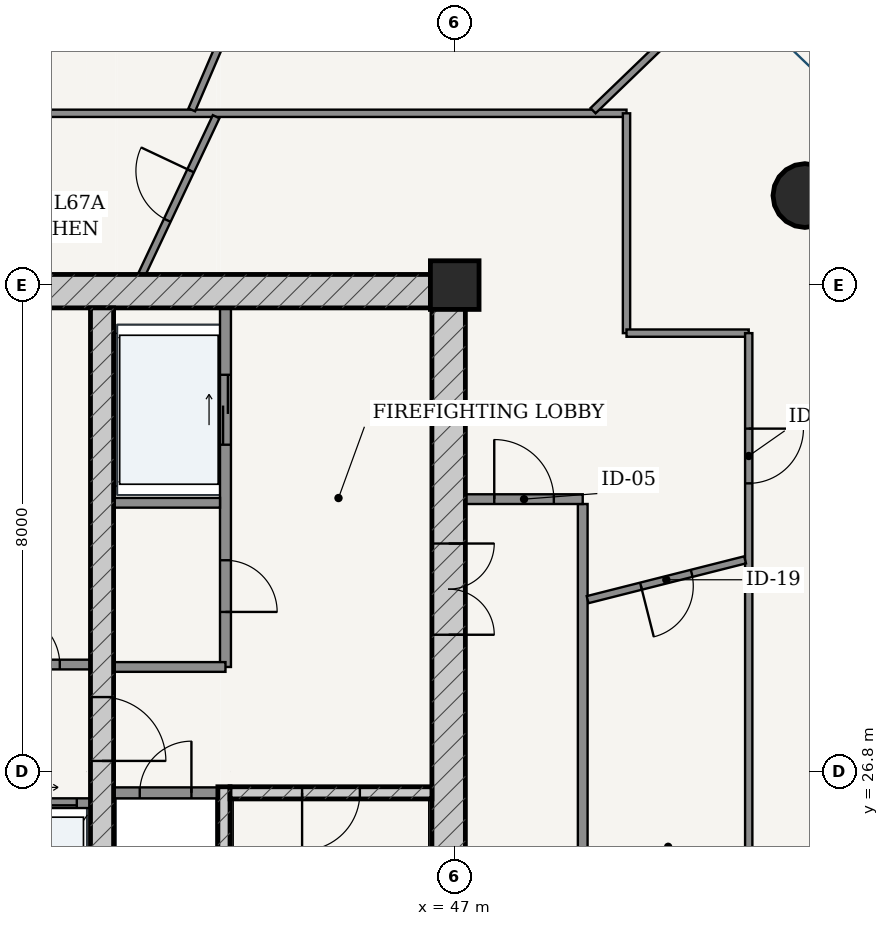
"""IFC4 building model, lengths in metres.
Left out: names, types, materials, properties, quantities, classifications, styles, units other than length and angle.
Written with IfcOpenShell. Run it as: python <this file> out.ifc"""

import sys

from ifc_helpers import new_model, si_unit, direction, frame, frame_2d, origin, origin_2d, place, context, subcontext, project, spatial, rectangle, hollow_circle, extrude, source, transform, mapped, element, fill, save


model = new_model("IFC4")
c1 = context("Model", 3, precision=1e-05, world=origin(), true_north=direction((-0.2419218956, 0.970295726276)))
c2 = subcontext(c1, "Body", "Model", "MODEL_VIEW")
j1 = project(units=[si_unit("LENGTHUNIT", "METRE"), si_unit("PLANEANGLEUNIT", "RADIAN")], contexts=[c1])
p1 = place(None, origin())
s1 = spatial("IfcSite", under=j1, at=p1, CompositionType="ELEMENT")
p2 = place(p1, origin())
s2 = spatial("IfcBuilding", under=s1, at=p2, CompositionType="ELEMENT")
p3 = place(p2, frame((0.0, 0.0, 255.7)))
s3 = spatial("IfcBuildingStorey", under=s2, at=p3, CompositionType="ELEMENT", Elevation=255.7)
p4 = place(p3, frame((47.0, 34.8, 0.0), z_axis=(0.0, 0.0, 1.0), x_axis=(1.0, 0.0, 0.0)))
e1 = element("IfcColumn", 1, at=p4, inside=s3, PredefinedType="COLUMN", context=c2, shape_type="SweptSolid", body=[
    extrude(rectangle(XDim=0.8, YDim=0.8, at=origin_2d()), origin(), (0.0, 0.0, 1.0), 3.75),
])
p5 = place(p3, frame((28.825, 34.7, 0.0), z_axis=(0.0, 0.0, 1.0), x_axis=(1.0, 0.0, 0.0)))
e2 = element("IfcWall", 2, at=p5, inside=s3, PredefinedType="SHEAR", context=c2, shape_type="SweptSolid", body=[
    extrude(rectangle(XDim=18.35, YDim=0.55, at=frame_2d((9.175, 0.0))), origin(), (0.0, 0.0, 1.0), 3.49),
])
p6 = place(p3, frame((46.9, 19.175, 0.0), z_axis=(0.0, 0.0, 1.0), x_axis=(0.0, 1.0, 0.0)))
e3 = element("IfcWall", 3, at=p6, inside=s3, PredefinedType="SHEAR", context=c2, shape_type="SweptSolid", body=[
    extrude(rectangle(XDim=15.25, YDim=0.55, at=frame_2d((7.625, 0.0))), origin(), (0.0, 0.0, 1.0), 3.49),
])
p7 = place(p6, frame((9.875, 0.0, 0.0)))
e4 = element("IfcOpeningElement", 4, at=p7, cuts=e3, PredefinedType="OPENING", context=c2, shape_type="SweptSolid", body=[
    extrude(rectangle(XDim=1.5, YDim=2.2, at=frame_2d((0.75, 1.1))), frame((0.0, 0.285, 0.0), z_axis=(0.0, -1.0, 0.0), x_axis=(1.0, 0.0, 0.0)), (0.0, 0.0, 1.0), 0.57),
])
p8 = place(p3, frame((43.205, 19.175, 0.0), z_axis=(0.0, 0.0, 1.0), x_axis=(0.0, 1.0, 0.0)))
e5 = element("IfcWall", 5, at=p8, inside=s3, PredefinedType="SOLIDWALL", context=c2, shape_type="SweptSolid", body=[
    extrude(rectangle(XDim=7.375, YDim=0.2, at=frame_2d((3.688, 0.0))), origin(), (0.0, 0.0, 1.0), 3.49),
])
p9 = place(p3, frame((43.305, 26.45, 0.0), z_axis=(0.0, 0.0, 1.0), x_axis=(1.0, 0.0, 0.0)))
e6 = element("IfcWall", 6, at=p9, inside=s3, PredefinedType="SOLIDWALL", context=c2, shape_type="SweptSolid", body=[
    extrude(rectangle(XDim=3.32, YDim=0.2, at=frame_2d((1.66, 0.0))), origin(), (0.0, 0.0, 1.0), 3.49),
])
p10 = place(p9, frame((1.185, 0.0, 0.0)))
e7 = element("IfcOpeningElement", 7, at=p10, cuts=e6, PredefinedType="OPENING", context=c2, shape_type="SweptSolid", body=[
    extrude(rectangle(XDim=0.95, YDim=2.15, at=frame_2d((0.475, 1.075))), frame((0.0, 0.11, 0.0), z_axis=(0.0, -1.0, 0.0), x_axis=(1.0, 0.0, 0.0)), (0.0, 0.0, 1.0), 0.22),
])
p11 = place(p3, frame((41.2, 19.175, 0.0), z_axis=(0.0, 0.0, 1.0), x_axis=(0.0, 1.0, 0.0)))
e8 = element("IfcWall", 8, at=p11, inside=s3, PredefinedType="SHEAR", context=c2, shape_type="SweptSolid", body=[
    extrude(rectangle(XDim=15.25, YDim=0.38, at=frame_2d((7.625, 0.0))), origin(), (0.0, 0.0, 1.0), 3.49),
])
p12 = place(p11, frame((7.8, 0.0, 0.0)))
e9 = element("IfcOpeningElement", 9, at=p12, cuts=e8, PredefinedType="OPENING", context=c2, shape_type="SweptSolid", body=[
    extrude(rectangle(XDim=1.05, YDim=2.15, at=frame_2d((0.525, 1.075))), frame((0.0, 0.2, 0.0), z_axis=(0.0, -1.0, 0.0), x_axis=(1.0, 0.0, 0.0)), (0.0, 0.0, 1.0), 0.4),
])
p13 = place(p3, frame((52.759, 36.272, 0.0), z_axis=(0.0, 0.0, 1.0), x_axis=(1.0, 0.0, 0.0)))
e10 = element("IfcColumn", 10, at=p13, inside=s3, PredefinedType="COLUMN", context=c2, shape_type="SweptSolid", body=[
    extrude(hollow_circle(Radius=0.525, WallThickness=0.035, at=origin_2d()), origin(), (0.0, 0.0, 1.0), 3.75),
])
p14 = place(p3, frame((41.39, 26.45, 0.0), z_axis=(0.0, 0.0, 1.0), x_axis=(1.0, 0.0, 0.0)))
e11 = element("IfcWall", 11, at=p14, inside=s3, PredefinedType="PARTITIONING", context=c2, shape_type="SweptSolid", body=[
    extrude(rectangle(XDim=1.71, YDim=0.18, at=frame_2d((0.855, 0.0))), origin(), (0.0, 0.0, 1.0), 3.49),
])
p15 = place(p14, frame((0.43, 0.0, 0.0)))
e12 = element("IfcOpeningElement", 12, at=p15, cuts=e11, PredefinedType="OPENING", context=c2, shape_type="SweptSolid", body=[
    extrude(rectangle(XDim=0.85, YDim=2.1, at=frame_2d((0.425, 1.05))), frame((0.0, 0.1, 0.0), z_axis=(0.0, -1.0, 0.0), x_axis=(1.0, 0.0, 0.0)), (0.0, 0.0, 1.0), 0.2),
])
p16 = place(p3, frame((43.23, 28.52, 0.0), z_axis=(0.0, 0.0, 1.0), x_axis=(0.0, 1.0, 0.0)))
e13 = element("IfcWall", 13, at=p16, inside=s3, PredefinedType="PARTITIONING", context=c2, shape_type="SweptSolid", body=[
    extrude(rectangle(XDim=5.905, YDim=0.18, at=frame_2d((2.953, 0.0))), origin(), (0.0, 0.0, 1.0), 3.49),
])
p17 = place(p16, frame((0.905, 0.0, 0.0)))
e14 = element("IfcOpeningElement", 14, at=p17, cuts=e13, PredefinedType="OPENING", context=c2, shape_type="SweptSolid", body=[
    extrude(rectangle(XDim=0.85, YDim=2.1, at=frame_2d((0.425, 1.05))), frame((0.0, 0.1, 0.0), z_axis=(0.0, -1.0, 0.0), x_axis=(1.0, 0.0, 0.0)), (0.0, 0.0, 1.0), 0.2),
])
p18 = place(p16, frame((3.655, 0.0, 0.0)))
e15 = element("IfcOpeningElement", 15, at=p18, cuts=e13, PredefinedType="OPENING", context=c2, shape_type="SweptSolid", body=[
    extrude(rectangle(XDim=1.15, YDim=2.2, at=frame_2d((0.575, 1.1))), frame((0.0, 0.1, 0.0), z_axis=(0.0, -1.0, 0.0), x_axis=(1.0, 0.0, 0.0)), (0.0, 0.0, 1.0), 0.2),
])
p19 = place(p3, frame((41.39, 31.22, 0.0), z_axis=(0.0, 0.0, 1.0), x_axis=(1.0, 0.0, 0.0)))
e16 = element("IfcWall", 16, at=p19, inside=s3, PredefinedType="PARTITIONING", context=c2, shape_type="SweptSolid", body=[
    extrude(rectangle(XDim=1.75, YDim=0.16, at=frame_2d((0.875, 0.0))), origin(), (0.0, 0.0, 1.0), 3.49),
])
p20 = place(p3, frame((41.39, 28.52, 0.0), z_axis=(0.0, 0.0, 1.0), x_axis=(1.0, 0.0, 0.0)))
e17 = element("IfcWall", 17, at=p20, inside=s3, PredefinedType="PARTITIONING", context=c2, shape_type="SweptSolid", body=[
    extrude(rectangle(XDim=1.84, YDim=0.16, at=frame_2d((0.92, 0.0))), origin(), (0.0, 0.0, 1.0), 3.49),
])
p21 = place(p3, frame((34.99, 28.56, 0.0), z_axis=(0.0, 0.0, 1.0), x_axis=(1.0, 0.0, 0.0)))
e18 = element("IfcWall", 18, at=p21, inside=s3, PredefinedType="PARTITIONING", context=c2, shape_type="SweptSolid", body=[
    extrude(rectangle(XDim=6.02, YDim=0.16, at=frame_2d((3.01, 0.0))), origin(), (0.0, 0.0, 1.0), 3.49),
])
p22 = place(p21, frame((0.505, 0.0, 0.0)))
e19 = element("IfcOpeningElement", 19, at=p22, cuts=e18, PredefinedType="OPENING", context=c2, shape_type="SweptSolid", body=[
    extrude(rectangle(XDim=0.85, YDim=2.1, at=frame_2d((0.425, 1.05))), frame((0.0, 0.09, 0.0), z_axis=(0.0, -1.0, 0.0), x_axis=(1.0, 0.0, 0.0)), (0.0, 0.0, 1.0), 0.18),
])
p23 = place(p21, frame((2.58, 0.0, 0.0)))
e20 = element("IfcOpeningElement", 20, at=p23, cuts=e18, PredefinedType="OPENING", context=c2, shape_type="SweptSolid", body=[
    extrude(rectangle(XDim=0.86, YDim=2.1, at=frame_2d((0.43, 1.05))), frame((0.0, 0.09, 0.0), z_axis=(0.0, -1.0, 0.0), x_axis=(1.0, 0.0, 0.0)), (0.0, 0.0, 1.0), 0.18),
])
p24 = place(p21, frame((4.665, 0.0, 0.0)))
e21 = element("IfcOpeningElement", 21, at=p24, cuts=e18, PredefinedType="OPENING", context=c2, shape_type="SweptSolid", body=[
    extrude(rectangle(XDim=0.85, YDim=2.1, at=frame_2d((0.425, 1.05))), frame((0.0, 0.09, 0.0), z_axis=(0.0, -1.0, 0.0), x_axis=(1.0, 0.0, 0.0)), (0.0, 0.0, 1.0), 0.18),
])
p25 = place(p3, frame((34.99, 26.28, 0.0), z_axis=(0.0, 0.0, 1.0), x_axis=(1.0, 0.0, 0.0)))
e22 = element("IfcWall", 22, at=p25, inside=s3, PredefinedType="PARTITIONING", context=c2, shape_type="SweptSolid", body=[
    extrude(rectangle(XDim=6.02, YDim=0.16, at=frame_2d((3.01, 0.0))), origin(), (0.0, 0.0, 1.0), 3.49),
])
p26 = place(p25, frame((1.045, 0.0, 0.0)))
e23 = element("IfcOpeningElement", 23, at=p26, cuts=e22, PredefinedType="OPENING", context=c2, shape_type="SweptSolid", body=[
    extrude(rectangle(XDim=0.85, YDim=2.1, at=frame_2d((0.425, 1.05))), frame((0.0, 0.09, 0.0), z_axis=(0.0, -1.0, 0.0), x_axis=(1.0, 0.0, 0.0)), (0.0, 0.0, 1.0), 0.18),
])
p27 = place(p25, frame((3.215, 0.0, 0.0)))
e24 = element("IfcOpeningElement", 24, at=p27, cuts=e22, PredefinedType="OPENING", context=c2, shape_type="SweptSolid", body=[
    extrude(rectangle(XDim=1.1, YDim=2.2, at=frame_2d((0.55, 1.1))), frame((0.0, 0.09, 0.0), z_axis=(0.0, -1.0, 0.0), x_axis=(1.0, 0.0, 0.0)), (0.0, 0.0, 1.0), 0.18),
])
p28 = place(p25, frame((4.695, 0.0, 0.0)))
e25 = element("IfcOpeningElement", 25, at=p28, cuts=e22, PredefinedType="OPENING", context=c2, shape_type="SweptSolid", body=[
    extrude(rectangle(XDim=1.1, YDim=2.2, at=frame_2d((0.55, 1.1))), frame((0.0, 0.09, 0.0), z_axis=(0.0, -1.0, 0.0), x_axis=(1.0, 0.0, 0.0)), (0.0, 0.0, 1.0), 0.18),
])
p29 = place(p3, frame((49.105, 17.275, 0.0), z_axis=(0.0, 0.0, 1.0), x_axis=(0.0, 1.0, 0.0)))
e26 = element("IfcWall", 26, at=p29, inside=s3, PredefinedType="PARTITIONING", context=c2, shape_type="SweptSolid", body=[
    extrude(rectangle(XDim=13.925, YDim=0.16, at=frame_2d((6.962, 0.0))), origin(), (0.0, 0.0, 1.0), 3.015),
])
p30 = place(p3, frame((47.175, 31.28, 0.0), z_axis=(0.0, 0.0, 1.0), x_axis=(1.0, 0.0, 0.0)))
e27 = element("IfcWall", 27, at=p30, inside=s3, PredefinedType="PARTITIONING", context=c2, shape_type="SweptSolid", body=[
    extrude(rectangle(XDim=1.93, YDim=0.16, at=frame_2d((0.965, 0.0))), origin(), (0.0, 0.0, 1.0), 3.49),
])
p31 = place(p30, frame((0.475, 0.0, 0.0)))
e28 = element("IfcOpeningElement", 28, at=p31, cuts=e27, PredefinedType="OPENING", context=c2, shape_type="SweptSolid", body=[
    extrude(rectangle(XDim=0.98, YDim=2.2, at=frame_2d((0.49, 1.1))), frame((0.0, 0.09, 0.0), z_axis=(0.0, -1.0, 0.0), x_axis=(1.0, 0.0, 0.0)), (0.0, 0.0, 1.0), 0.18),
])
p32 = place(p3, frame((26.175, 37.625, 0.0), z_axis=(0.0, 0.0, 1.0), x_axis=(1.0, 0.0, 0.0)))
e29 = element("IfcWall", 29, at=p32, inside=s3, PredefinedType="PARTITIONING", context=c2, shape_type="SweptSolid", body=[
    extrude(rectangle(XDim=23.65, YDim=0.12, at=frame_2d((11.825, 0.0))), origin(), (0.0, 0.0, 1.0), 3.015),
])
p33 = place(p32, frame((12.791, 0.0, 0.0)))
e30 = element("IfcOpeningElement", 30, at=p33, cuts=e29, PredefinedType="OPENING", context=c2, shape_type="SweptSolid", body=[
    extrude(rectangle(XDim=0.9, YDim=2.15, at=frame_2d((0.45, 1.075))), frame((0.0, 0.07, 0.0), z_axis=(0.0, -1.0, 0.0), x_axis=(1.0, 0.0, 0.0)), (0.0, 0.0, 1.0), 0.14),
])
p34 = place(p32, frame((6.48, 0.0, 0.0)))
e31 = element("IfcOpeningElement", 31, at=p34, cuts=e29, PredefinedType="OPENING", context=c2, shape_type="SweptSolid", body=[
    extrude(rectangle(XDim=0.9, YDim=2.15, at=frame_2d((0.45, 1.075))), frame((0.0, 0.07, 0.0), z_axis=(0.0, -1.0, 0.0), x_axis=(1.0, 0.0, 0.0)), (0.0, 0.0, 1.0), 0.14),
])
p35 = place(p32, frame((1.831, 0.0, 0.0)))
e32 = element("IfcOpeningElement", 32, at=p35, cuts=e29, PredefinedType="OPENING", context=c2, shape_type="SweptSolid", body=[
    extrude(rectangle(XDim=0.9, YDim=2.15, at=frame_2d((0.45, 1.075))), frame((0.0, 0.07, 0.0), z_axis=(0.0, -1.0, 0.0), x_axis=(1.0, 0.0, 0.0)), (0.0, 0.0, 1.0), 0.14),
])
p36 = place(p3, frame((49.825, 37.625, 0.0), z_axis=(0.0, 0.0, 1.0), x_axis=(0.0, -1.0, 0.0)))
e33 = element("IfcWall", 33, at=p36, inside=s3, PredefinedType="PARTITIONING", context=c2, shape_type="SweptSolid", body=[
    extrude(rectangle(XDim=3.615, YDim=0.12, at=frame_2d((1.808, 0.0))), origin(), (0.0, 0.0, 1.0), 3.015),
])
p37 = place(p3, frame((49.825, 34.01, 0.0), z_axis=(0.0, 0.0, 1.0), x_axis=(1.0, 0.0, 0.0)))
e34 = element("IfcWall", 34, at=p37, inside=s3, PredefinedType="PARTITIONING", context=c2, shape_type="SweptSolid", body=[
    extrude(rectangle(XDim=2.01, YDim=0.12, at=frame_2d((1.005, 0.0))), origin(), (0.0, 0.0, 1.0), 3.209),
])
p38 = place(p3, frame((51.835, 34.01, 0.0), z_axis=(0.0, 0.0, 1.0), x_axis=(0.0, -1.0, 0.0)))
e35 = element("IfcWall", 35, at=p38, inside=s3, PredefinedType="PARTITIONING", context=c2, shape_type="SweptSolid", body=[
    extrude(rectangle(XDim=12.632, YDim=0.12, at=frame_2d((6.316, 0.0))), origin(), (0.0, 0.0, 1.0), 3.015),
])
p39 = place(p38, frame((1.57, 0.0, 0.0)))
e36 = element("IfcOpeningElement", 36, at=p39, cuts=e35, PredefinedType="OPENING", context=c2, shape_type="SweptSolid", body=[
    extrude(rectangle(XDim=0.9, YDim=2.15, at=frame_2d((0.45, 1.075))), frame((0.0, 0.07, 0.0), z_axis=(0.0, -1.0, 0.0), x_axis=(1.0, 0.0, 0.0)), (0.0, 0.0, 1.0), 0.14),
])
p40 = place(p3, frame((49.275, 37.668, 0.0), z_axis=(0.0, 0.0, 1.0), x_axis=(0.719954096891, 0.694021684366, 0.0)))
e37 = element("IfcWall", 37, at=p40, inside=s3, PredefinedType="PARTITIONING", context=c2, shape_type="SweptSolid", body=[
    extrude(rectangle(XDim=3.333, YDim=0.12, at=frame_2d((1.667, 0.0))), origin(), (0.0, 0.0, 1.0), 3.121),
])
p41 = place(p3, frame((42.676, 37.682, 0.0), z_axis=(0.0, 0.0, 1.0), x_axis=(0.394777489933, 0.918776759307, 0.0)))
e38 = element("IfcWall", 38, at=p41, inside=s3, PredefinedType="PARTITIONING", context=c2, shape_type="SweptSolid", body=[
    extrude(rectangle(XDim=6.9, YDim=0.12, at=frame_2d((3.45, 0.0))), origin(), (0.0, 0.0, 1.0), 3.121),
])
p42 = place(p41, frame((3.0, 0.0, 0.0)))
e39 = element("IfcOpeningElement", 39, at=p42, cuts=e38, PredefinedType="OPENING", context=c2, shape_type="SweptSolid", body=[
    extrude(rectangle(XDim=0.9, YDim=2.15, at=frame_2d((0.45, 1.075))), frame((0.0, 0.07, 0.0), z_axis=(0.0, -1.0, 0.0), x_axis=(1.0, 0.0, 0.0)), (0.0, 0.0, 1.0), 0.14),
])
p43 = place(p3, frame((49.185, 29.627, 0.0), z_axis=(0.0, 0.0, 1.0), x_axis=(0.969515658159, 0.2450293627, 0.0)))
e40 = element("IfcWall", 40, at=p43, inside=s3, PredefinedType="PARTITIONING", context=c2, shape_type="SweptSolid", body=[
    extrude(rectangle(XDim=2.671, YDim=0.12, at=frame_2d((1.336, 0.0))), origin(), (0.0, 0.0, 1.0), 3.209),
])
p44 = place(p43, frame((0.906, 0.0, 0.0)))
e41 = element("IfcOpeningElement", 41, at=p44, cuts=e40, PredefinedType="OPENING", context=c2, shape_type="SweptSolid", body=[
    extrude(rectangle(XDim=0.86, YDim=2.15, at=frame_2d((0.43, 1.075))), frame((0.0, 0.07, 0.0), z_axis=(0.0, -1.0, 0.0), x_axis=(1.0, 0.0, 0.0)), (0.0, 0.0, 1.0), 0.14),
])
p45 = place(p3, frame((41.854, 34.977, 0.0), z_axis=(0.0, 0.0, 1.0), x_axis=(0.42640827804, 0.904530806783, 0.0)))
e42 = element("IfcWall", 42, at=p45, inside=s3, PredefinedType="PARTITIONING", context=c2, shape_type="SweptSolid", body=[
    extrude(rectangle(XDim=2.866, YDim=0.12, at=frame_2d((1.433, 0.0))), origin(), (0.0, 0.0, 1.0), 3.49),
])
p46 = place(p45, frame((0.983, 0.0, 0.0)))
e43 = element("IfcOpeningElement", 43, at=p46, cuts=e42, PredefinedType="OPENING", context=c2, shape_type="SweptSolid", body=[
    extrude(rectangle(XDim=0.9, YDim=2.15, at=frame_2d((0.45, 1.075))), frame((0.0, 0.07, 0.0), z_axis=(0.0, -1.0, 0.0), x_axis=(1.0, 0.0, 0.0)), (0.0, 0.0, 1.0), 0.14),
])
m1 = source(origin(), c2, "Body", "SweptSolid", [
    extrude(rectangle(XDim=1.5, YDim=2.2, at=frame_2d((0.75, 1.1))), frame((0.0, 0.025, 0.0), z_axis=(0.0, -1.0, 0.0), x_axis=(1.0, 0.0, 0.0)), (0.0, 0.0, 1.0), 0.05),
])
p47 = place(p7, frame((1.5, 0.0, 0.0), z_axis=(0.0, 0.0, 1.0), x_axis=(-1.0, 0.0, 0.0)))
e44 = element("IfcDoor", 44, at=p47, inside=s3, OperationType="DOUBLE_DOOR_SINGLE_SWING", PredefinedType="DOOR", context=c2, shape_type="MappedRepresentation", body=[
    mapped(m1, transform((0.0, 0.0, 0.0), scale=1.0)),
])
fill(e4, e44)
m2 = source(origin(), c2, "Body", "SweptSolid", [
    extrude(rectangle(XDim=1.05, YDim=2.15, at=frame_2d((0.525, 1.075))), frame((0.0, 0.025, 0.0), z_axis=(0.0, -1.0, 0.0), x_axis=(1.0, 0.0, 0.0)), (0.0, 0.0, 1.0), 0.05),
])
p48 = place(p12, frame((1.05, 0.0, 0.0), z_axis=(0.0, 0.0, 1.0), x_axis=(-1.0, 0.0, 0.0)))
e45 = element("IfcDoor", 45, at=p48, inside=s3, OperationType="SINGLE_SWING_RIGHT", PredefinedType="DOOR", context=c2, shape_type="MappedRepresentation", body=[
    mapped(m2, transform((0.0, 0.0, 0.0), scale=1.0)),
])
fill(e9, e45)
m3 = source(origin(), c2, "Body", "SweptSolid", [
    extrude(rectangle(XDim=0.95, YDim=2.15, at=frame_2d((0.475, 1.075))), frame((0.0, 0.025, 0.0), z_axis=(0.0, -1.0, 0.0), x_axis=(1.0, 0.0, 0.0)), (0.0, 0.0, 1.0), 0.05),
])
p49 = place(p10, frame((0.95, 0.0, 0.0), z_axis=(0.0, 0.0, 1.0), x_axis=(-1.0, 0.0, 0.0)))
e46 = element("IfcDoor", 46, at=p49, inside=s3, OperationType="SINGLE_SWING_RIGHT", PredefinedType="DOOR", context=c2, shape_type="MappedRepresentation", body=[
    mapped(m3, transform((0.0, 0.0, 0.0), scale=1.0)),
])
fill(e7, e46)
m4 = source(origin(), c2, "Body", "SweptSolid", [
    extrude(rectangle(XDim=0.85, YDim=2.1, at=frame_2d((0.425, 1.05))), frame((0.0, 0.025, 0.0), z_axis=(0.0, -1.0, 0.0), x_axis=(1.0, 0.0, 0.0)), (0.0, 0.0, 1.0), 0.05),
])
p50 = place(p15, origin())
e47 = element("IfcDoor", 47, at=p50, inside=s3, OperationType="SINGLE_SWING_RIGHT", PredefinedType="DOOR", context=c2, shape_type="MappedRepresentation", body=[
    mapped(m4, transform((0.0, 0.0, 0.0), scale=1.0)),
])
fill(e12, e47)
p51 = place(p17, frame((0.85, 0.0, 0.0), z_axis=(0.0, 0.0, 1.0), x_axis=(-1.0, 0.0, 0.0)))
e48 = element("IfcDoor", 48, at=p51, inside=s3, OperationType="SINGLE_SWING_RIGHT", PredefinedType="DOOR", context=c2, shape_type="MappedRepresentation", body=[
    mapped(m4, transform((0.0, 0.0, 0.0), scale=1.0)),
])
fill(e14, e48)
p52 = place(p24, origin())
e49 = element("IfcDoor", 49, at=p52, inside=s3, OperationType="SINGLE_SWING_LEFT", PredefinedType="DOOR", context=c2, shape_type="MappedRepresentation", body=[
    mapped(m4, transform((0.0, 0.0, 0.0), scale=1.0)),
])
fill(e21, e49)
m5 = source(origin(), c2, "Body", "SweptSolid", [
    extrude(rectangle(XDim=1.15, YDim=2.2, at=frame_2d((0.575, 1.1))), frame((0.0, 0.025, 0.0), z_axis=(0.0, -1.0, 0.0), x_axis=(1.0, 0.0, 0.0)), (0.0, 0.0, 1.0), 0.05),
])
p53 = place(p18, origin())
e50 = element("IfcDoor", 50, at=p53, inside=s3, OperationType="DOUBLE_DOOR_SLIDING", PredefinedType="DOOR", context=c2, shape_type="MappedRepresentation", body=[
    mapped(m5, transform((0.0, 0.0, 0.0), scale=1.0)),
])
fill(e15, e50)
m6 = source(origin(), c2, "Body", "SweptSolid", [
    extrude(rectangle(XDim=1.1, YDim=2.2, at=frame_2d((0.55, 1.1))), frame((0.0, 0.025, 0.0), z_axis=(0.0, -1.0, 0.0), x_axis=(1.0, 0.0, 0.0)), (0.0, 0.0, 1.0), 0.05),
])
p54 = place(p28, origin())
e51 = element("IfcDoor", 51, at=p54, inside=s3, OperationType="DOUBLE_DOOR_SLIDING", PredefinedType="DOOR", context=c2, shape_type="MappedRepresentation", body=[
    mapped(m6, transform((0.0, 0.0, 0.0), scale=1.0)),
])
fill(e25, e51)
m7 = source(origin(), c2, "Body", "SweptSolid", [
    extrude(rectangle(XDim=0.98, YDim=2.2, at=frame_2d((0.49, 1.1))), frame((0.0, 0.025, 0.0), z_axis=(0.0, -1.0, 0.0), x_axis=(1.0, 0.0, 0.0)), (0.0, 0.0, 1.0), 0.05),
])
p55 = place(p31, origin())
e52 = element("IfcDoor", 52, at=p55, inside=s3, OperationType="SINGLE_SWING_LEFT", PredefinedType="DOOR", context=c2, shape_type="MappedRepresentation", body=[
    mapped(m7, transform((0.0, 0.0, 0.0), scale=1.0)),
])
fill(e28, e52)
m8 = source(origin(), c2, "Body", "SweptSolid", [
    extrude(rectangle(XDim=0.86, YDim=2.15, at=frame_2d((0.43, 1.075))), frame((0.0, 0.025, 0.0), z_axis=(0.0, -1.0, 0.0), x_axis=(1.0, 0.0, 0.0)), (0.0, 0.0, 1.0), 0.05),
])
p56 = place(p44, frame((0.86, 0.0, 0.0), z_axis=(0.0, 0.0, 1.0), x_axis=(-1.0, 0.0, 0.0)))
e53 = element("IfcDoor", 53, at=p56, inside=s3, OperationType="SINGLE_SWING_RIGHT", PredefinedType="DOOR", context=c2, shape_type="MappedRepresentation", body=[
    mapped(m8, transform((0.0, 0.0, 0.0), scale=1.0)),
])
fill(e41, e53)
m9 = source(origin(), c2, "Body", "SweptSolid", [
    extrude(rectangle(XDim=0.9, YDim=2.15, at=frame_2d((0.45, 1.075))), frame((0.0, 0.025, 0.0), z_axis=(0.0, -1.0, 0.0), x_axis=(1.0, 0.0, 0.0)), (0.0, 0.0, 1.0), 0.05),
])
p57 = place(p39, origin())
e54 = element("IfcDoor", 54, at=p57, inside=s3, OperationType="SINGLE_SWING_LEFT", PredefinedType="DOOR", context=c2, shape_type="MappedRepresentation", body=[
    mapped(m9, transform((0.0, 0.0, 0.0), scale=1.0)),
])
fill(e36, e54)
p58 = place(p46, origin())
e55 = element("IfcDoor", 55, at=p58, inside=s3, OperationType="SINGLE_SWING_RIGHT", PredefinedType="DOOR", context=c2, shape_type="MappedRepresentation", body=[
    mapped(m9, transform((0.0, 0.0, 0.0), scale=1.0)),
])
fill(e43, e55)
save(model, sys.argv[1])
